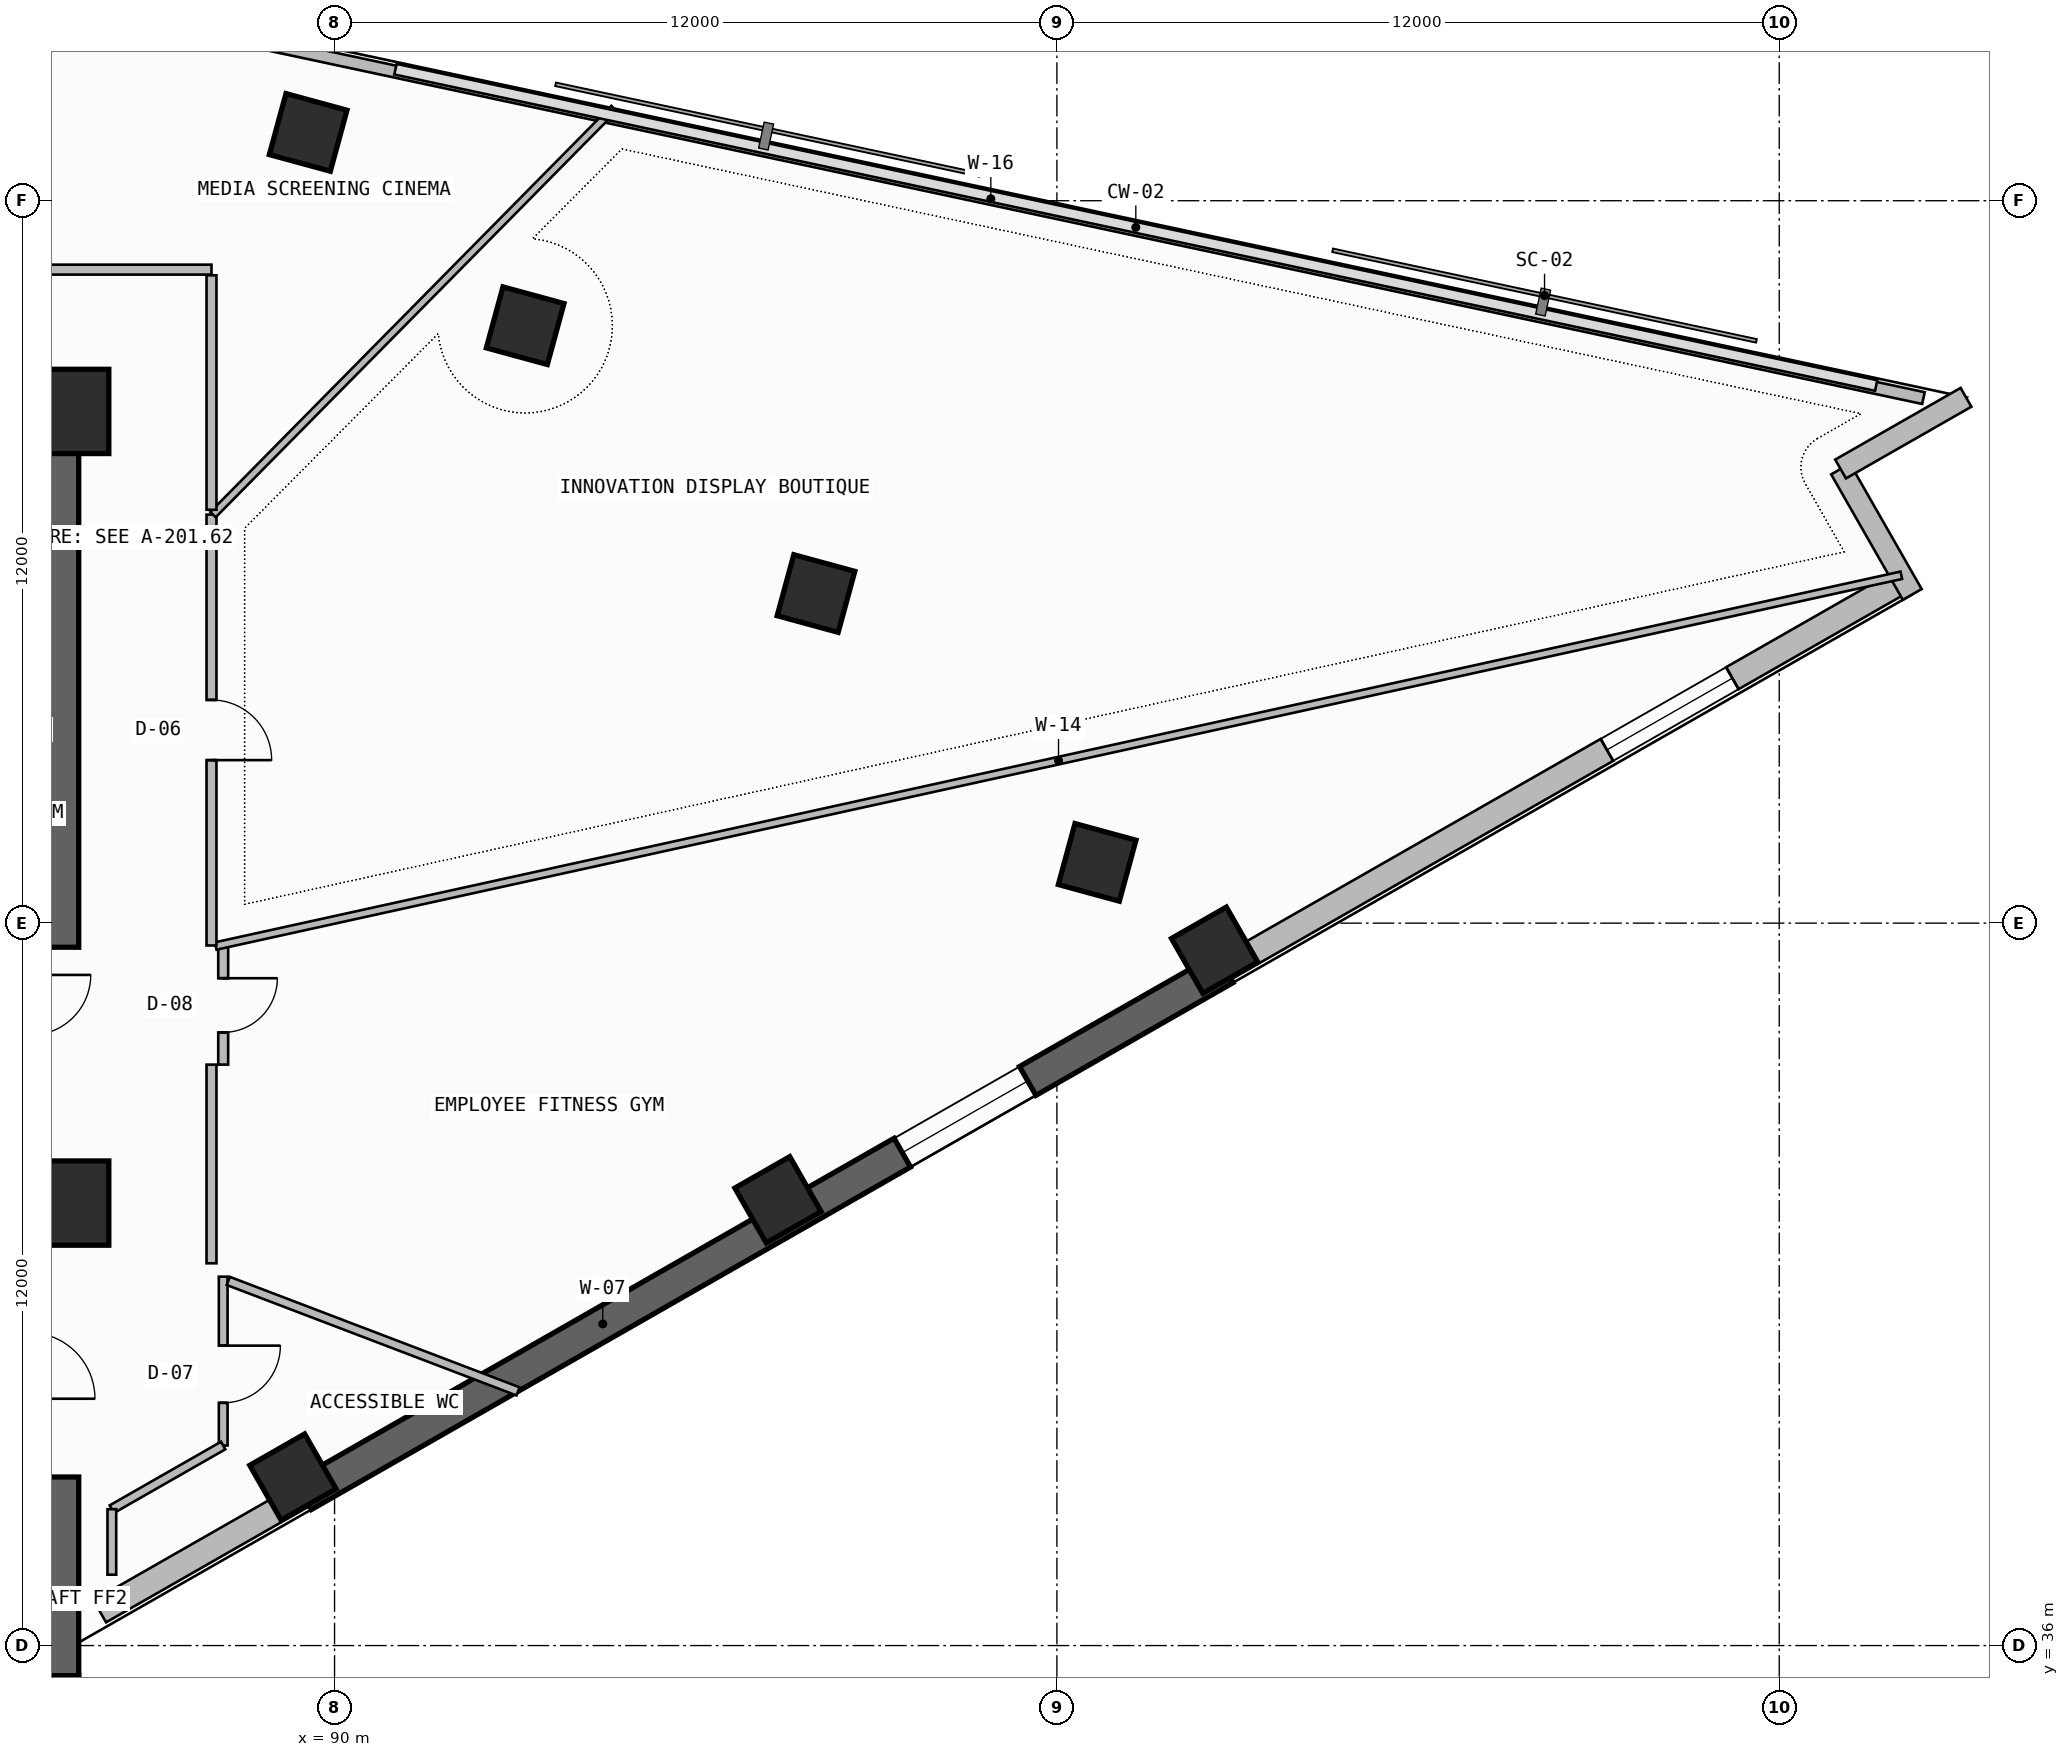
"""IFC4 building model, lengths in metres.
Left out: names, types, materials, properties, quantities, classifications, styles, units other than length and angle.
Written with IfcOpenShell. Run it as: python <this file> out.ifc"""

import sys

from ifc_helpers import new_model, si_unit, direction, frame, frame_2d, origin, origin_2d, place, context, subcontext, project, spatial, rectangle, extrude, element, fill, save


model = new_model("IFC4")
c1 = context("Model", 3, precision=1e-05, world=origin(), true_north=direction((0.0, 1.0)))
c2 = subcontext(c1, "Body", "Model", "MODEL_VIEW")
j1 = project(units=[si_unit("LENGTHUNIT", "METRE"), si_unit("PLANEANGLEUNIT", "RADIAN")], contexts=[c1])
p1 = place(None, origin())
s1 = spatial("IfcSite", under=j1, at=p1, CompositionType="ELEMENT")
p2 = place(p1, origin())
s2 = spatial("IfcBuilding", under=s1, at=p2, CompositionType="ELEMENT")
p3 = place(p2, frame((0.0, 0.0, 222.02)))
s3 = spatial("IfcBuildingStorey", under=s2, at=p3, CompositionType="ELEMENT", Elevation=222.02)
p4 = place(p3, frame((72.15, 35.125, -0.26), z_axis=(0.0, 0.0, 1.0), x_axis=(1.0, 0.0, 0.0)))
e1 = element("IfcWall", 1, at=p4, inside=s3, PredefinedType="SHEAR", context=c2, shape_type="SweptSolid", body=[
    extrude(rectangle(XDim=13.6, YDim=0.75, at=frame_2d((6.8, 0.0))), origin(), (0.0, 0.0, 1.0), 3.52),
])
p5 = place(p3, frame((85.375, 35.5, -0.26), z_axis=(0.0, 0.0, 1.0), x_axis=(0.0, 1.0, 0.0)))
e2 = element("IfcWall", 2, at=p5, inside=s3, PredefinedType="SHEAR", context=c2, shape_type="SweptSolid", body=[
    extrude(rectangle(XDim=3.3, YDim=0.75, at=frame_2d((1.65, 0.0))), origin(), (0.0, 0.0, 1.0), 3.52),
])
p6 = place(p3, frame((72.0, 56.425, -0.26), z_axis=(0.0, 0.0, 1.0), x_axis=(1.0, 0.0, 0.0)))
e3 = element("IfcWall", 3, at=p6, inside=s3, PredefinedType="SHEAR", context=c2, shape_type="SweptSolid", body=[
    extrude(rectangle(XDim=13.75, YDim=0.75, at=frame_2d((6.875, 0.0))), origin(), (0.0, 0.0, 1.0), 3.52),
])
p7 = place(p3, frame((85.375, 47.6, -0.26), z_axis=(0.0, 0.0, 1.0), x_axis=(0.0, 1.0, 0.0)))
e4 = element("IfcWall", 4, at=p7, inside=s3, PredefinedType="SHEAR", context=c2, shape_type="SweptSolid", body=[
    extrude(rectangle(XDim=8.45, YDim=0.75, at=frame_2d((4.225, 0.0))), origin(), (0.0, 0.0, 1.0), 3.52),
])
for number, where, z_axis, x_axis in (
    (5, (85.55, 43.35, 0.0), (0.0, 0.0, 1.0), (1.0, 0.0, 0.0)),
    (6, (85.55, 56.5, 0.0), (0.0, 0.0, 1.0), (1.0, 0.0, 0.0)),
):
    element("IfcColumn", number, at=place(p3, frame(where, z_axis=z_axis, x_axis=x_axis)), inside=s3, PredefinedType="COLUMN", context=c2, shape_type="SweptSolid", body=[
        extrude(rectangle(XDim=1.4, YDim=1.4, at=origin_2d()), origin(), (0.0, 0.0, 1.0), 3.52),
    ])
for number, where, z_axis, x_axis in (
    (7, (89.308, 38.799, 0.0), (0.0, 0.0, 1.0), (0.868, 0.496, 0.0)),
    (8, (97.367, 43.405, 0.0), (0.0, 0.0, 1.0), (0.868, 0.496, 0.0)),
    (9, (104.62, 47.55, 0.0), (0.0, 0.0, 1.0), (0.868, 0.496, 0.0)),
    (10, (102.669, 49.01, 0.0), (0.0, 0.0, 1.0), (0.263, 0.965, 0.0)),
    (11, (97.998, 53.475, 0.0), (0.0, 0.0, 1.0), (0.263, 0.965, 0.0)),
    (12, (93.167, 57.924, 0.0), (0.0, 0.0, 1.0), (0.263, 0.965, 0.0)),
    (13, (89.562, 61.135, 0.0), (0.0, 0.0, 1.0), (0.263, 0.965, 0.0)),
):
    element("IfcColumn", number, at=place(p3, frame(where, z_axis=z_axis, x_axis=x_axis)), inside=s3, PredefinedType="COLUMN", context=c2, shape_type="SweptSolid", body=[
        extrude(rectangle(XDim=1.05, YDim=1.05, at=origin_2d()), origin(), (0.0, 0.0, 1.0), 3.52),
    ])
p8 = place(p3, frame((86.1, 36.568, 0.0), z_axis=(0.0, 0.0, 1.0), x_axis=(0.868192956745, 0.496226752461, 0.0)))
e14 = element("IfcWall", 14, at=p8, inside=s3, PredefinedType="SOLIDWALL", context=c2, shape_type="SweptSolid", body=[
    extrude(rectangle(XDim=3.892, YDim=0.42, at=frame_2d((1.946, 0.0))), origin(), (0.0, 0.0, 1.0), 2.245),
])
p9 = place(p3, frame((89.479, 38.499, -0.26), z_axis=(0.0, 0.0, 1.0), x_axis=(0.868197136736, 0.496219439123, 0.0)))
e15 = element("IfcWall", 15, at=p9, inside=s3, PredefinedType="SHEAR", context=c2, shape_type="SweptSolid", body=[
    extrude(rectangle(XDim=17.636, YDim=0.55, at=frame_2d((8.818, 0.0))), origin(), (0.0, 0.0, 1.0), 3.52),
])
p10 = place(p9, frame((11.464, 0.0, 1.1)))
e16 = element("IfcOpeningElement", 16, at=p10, cuts=e15, PredefinedType="OPENING", context=c2, shape_type="SweptSolid", body=[
    extrude(rectangle(XDim=2.4, YDim=1.2, at=frame_2d((1.2, 0.6))), frame((0.0, 0.285, 0.0), z_axis=(0.0, -1.0, 0.0), x_axis=(1.0, 0.0, 0.0)), (0.0, 0.0, 1.0), 0.57),
])
p11 = place(p3, frame((104.791, 47.25, 0.0), z_axis=(0.0, 0.0, 1.0), x_axis=(0.868193423982, 0.496225934987, 0.0)))
e17 = element("IfcWall", 17, at=p11, inside=s3, PredefinedType="SOLIDWALL", context=c2, shape_type="SweptSolid", body=[
    extrude(rectangle(XDim=12.995, YDim=0.42, at=frame_2d((6.498, 0.0))), origin(), (0.0, 0.0, 1.0), 2.245),
])
p12 = place(p11, frame((7.31, 0.0, 0.965)))
e18 = element("IfcOpeningElement", 18, at=p12, cuts=e17, PredefinedType="OPENING", context=c2, shape_type="SweptSolid", body=[
    extrude(rectangle(XDim=2.4, YDim=1.2, at=frame_2d((1.2, 0.6))), frame((0.0, 0.22, 0.0), z_axis=(0.0, -1.0, 0.0), x_axis=(1.0, 0.0, 0.0)), (0.0, 0.0, 1.0), 0.44),
])
p13 = place(p3, frame((116.21, 53.46, 0.0), z_axis=(0.0, 0.0, 1.0), x_axis=(-0.496215637313, 0.868199309655, 0.0)))
e19 = element("IfcWall", 19, at=p13, inside=s3, PredefinedType="SOLIDWALL", context=c2, shape_type="SweptSolid", body=[
    extrude(rectangle(XDim=2.399, YDim=0.36, at=frame_2d((1.2, 0.0))), origin(), (0.0, 0.0, 1.0), 3.26),
])
p14 = place(p3, frame((115.019, 55.543, 0.0), z_axis=(0.0, 0.0, 1.0), x_axis=(0.86818053093, 0.4962484919, 0.0)))
e20 = element("IfcWall", 20, at=p14, inside=s3, PredefinedType="SOLIDWALL", context=c2, shape_type="SweptSolid", body=[
    extrude(rectangle(XDim=2.4, YDim=0.36, at=frame_2d((1.2, 0.0))), origin(), (0.0, 0.0, 1.0), 3.26),
])
p15 = place(p3, frame((116.396, 56.722, 0.0), z_axis=(0.0, 0.0, 1.0), x_axis=(-0.977936620644, 0.208901809478, 0.0)))
e21 = element("IfcWall", 21, at=p15, inside=s3, PredefinedType="PARAPET", context=c2, shape_type="SweptSolid", body=[
    extrude(rectangle(XDim=31.685, YDim=0.2, at=frame_2d((15.843, 0.0))), origin(), (0.0, 0.0, 1.0), 1.15),
])
p16 = place(p3, frame((88.15, 39.323, 0.0), z_axis=(0.0, 0.0, 1.0), x_axis=(0.0, 1.0, 0.0)))
e22 = element("IfcWall", 22, at=p16, inside=s3, PredefinedType="PARTITIONING", context=c2, shape_type="SweptSolid", body=[
    extrude(rectangle(XDim=2.805, YDim=0.145, at=frame_2d((1.402, 0.0))), origin(), (0.0, 0.0, 1.0), 2.745),
])
p17 = place(p16, frame((0.709, 0.0, 0.0)))
e23 = element("IfcOpeningElement", 23, at=p17, cuts=e22, PredefinedType="OPENING", context=c2, shape_type="SweptSolid", body=[
    extrude(rectangle(XDim=0.95, YDim=2.15, at=frame_2d((0.475, 1.075))), frame((0.0, 0.083, 0.0), z_axis=(0.0, -1.0, 0.0), x_axis=(1.0, 0.0, 0.0)), (0.0, 0.0, 1.0), 0.165),
])
p18 = place(p3, frame((86.3, 38.266, 0.0), z_axis=(0.0, 0.0, 1.0), x_axis=(0.868179674817, 0.496249989657, 0.0)))
e24 = element("IfcWall", 24, at=p18, inside=s3, PredefinedType="PARTITIONING", context=c2, shape_type="SweptSolid", body=[
    extrude(rectangle(XDim=2.131, YDim=0.145, at=frame_2d((1.065, 0.0))), origin(), (0.0, 0.0, 1.0), 3.26),
])
p19 = place(p3, frame((88.235, 42.057, 0.0), z_axis=(0.0, 0.0, 1.0), x_axis=(0.934412638953, -0.356192392066, 0.0)))
e25 = element("IfcWall", 25, at=p19, inside=s3, PredefinedType="PARTITIONING", context=c2, shape_type="SweptSolid", body=[
    extrude(rectangle(XDim=5.152, YDim=0.145, at=frame_2d((2.576, 0.0))), origin(), (0.0, 0.0, 1.0), 2.245),
])
p20 = place(p3, frame((87.955, 42.35, 0.0), z_axis=(0.0, 0.0, 1.0), x_axis=(0.0, 1.0, 0.0)))
e26 = element("IfcWall", 26, at=p20, inside=s3, PredefinedType="PARTITIONING", context=c2, shape_type="SweptSolid", body=[
    extrude(rectangle(XDim=3.3, YDim=0.165, at=frame_2d((1.65, 0.0))), origin(), (0.0, 0.0, 1.0), 2.745),
])
p21 = place(p3, frame((88.15, 45.65, 0.0), z_axis=(0.0, 0.0, 1.0), x_axis=(0.0, 1.0, 0.0)))
e27 = element("IfcWall", 27, at=p21, inside=s3, PredefinedType="PARTITIONING", context=c2, shape_type="SweptSolid", body=[
    extrude(rectangle(XDim=1.97, YDim=0.165, at=frame_2d((0.985, 0.0))), origin(), (0.0, 0.0, 1.0), 3.26),
])
p22 = place(p21, frame((0.535, 0.0, 0.0)))
e28 = element("IfcOpeningElement", 28, at=p22, cuts=e27, PredefinedType="OPENING", context=c2, shape_type="SweptSolid", body=[
    extrude(rectangle(XDim=0.9, YDim=2.1, at=frame_2d((0.45, 1.05))), frame((0.0, 0.093, 0.0), z_axis=(0.0, -1.0, 0.0), x_axis=(1.0, 0.0, 0.0)), (0.0, 0.0, 1.0), 0.185),
])
p23 = place(p3, frame((88.026, 47.62, 0.0), z_axis=(0.0, 0.0, 1.0), x_axis=(0.976658973775, 0.214795830835, 0.0)))
e29 = element("IfcWall", 29, at=p23, inside=s3, PredefinedType="PARTITIONING", context=c2, shape_type="SweptSolid", body=[
    extrude(rectangle(XDim=28.671, YDim=0.125, at=frame_2d((14.335, 0.0))), origin(), (0.0, 0.0, 1.0), 2.645),
])
p24 = place(p3, frame((87.955, 47.629, 0.0), z_axis=(0.0, 0.0, 1.0), x_axis=(0.0, 1.0, 0.0)))
e30 = element("IfcWall", 30, at=p24, inside=s3, PredefinedType="PARTITIONING", context=c2, shape_type="SweptSolid", body=[
    extrude(rectangle(XDim=7.157, YDim=0.165, at=frame_2d((3.579, 0.0))), origin(), (0.0, 0.0, 1.0), 3.26),
])
p25 = place(p24, frame((3.079, 0.0, 0.0)))
e31 = element("IfcOpeningElement", 31, at=p25, cuts=e30, PredefinedType="OPENING", context=c2, shape_type="SweptSolid", body=[
    extrude(rectangle(XDim=1.0, YDim=2.2, at=frame_2d((0.5, 1.1))), frame((0.0, 0.093, 0.0), z_axis=(0.0, -1.0, 0.0), x_axis=(1.0, 0.0, 0.0)), (0.0, 0.0, 1.0), 0.185),
])
p26 = place(p3, frame((87.981, 54.786, 0.0), z_axis=(0.0, 0.0, 1.0), x_axis=(0.702637523149, 0.711547968209, 0.0)))
e32 = element("IfcWall", 32, at=p26, inside=s3, PredefinedType="PARTITIONING", context=c2, shape_type="SweptSolid", body=[
    extrude(rectangle(XDim=9.48, YDim=0.125, at=frame_2d((4.74, 0.0))), origin(), (0.0, 0.0, 1.0), 2.645),
])
p27 = place(p3, frame((87.955, 58.855, 0.0), z_axis=(0.0, 0.0, 1.0), x_axis=(-1.0, 0.0, 0.0)))
e33 = element("IfcWall", 33, at=p27, inside=s3, PredefinedType="PARTITIONING", context=c2, shape_type="SweptSolid", body=[
    extrude(rectangle(XDim=6.296, YDim=0.165, at=frame_2d((3.148, 0.0))), origin(), (0.0, 0.0, 1.0), 2.745),
])
p28 = place(p27, frame((3.382, 0.0, 0.0)))
e34 = element("IfcOpeningElement", 34, at=p28, cuts=e33, PredefinedType="OPENING", context=c2, shape_type="SweptSolid", body=[
    extrude(rectangle(XDim=1.0, YDim=2.2, at=frame_2d((0.5, 1.1))), frame((0.0, 0.093, 0.0), z_axis=(0.0, -1.0, 0.0), x_axis=(1.0, 0.0, 0.0)), (0.0, 0.0, 1.0), 0.185),
])
p29 = place(p3, frame((87.955, 54.866, 0.0), z_axis=(0.0, 0.0, 1.0), x_axis=(0.0, 1.0, 0.0)))
e35 = element("IfcWall", 35, at=p29, inside=s3, PredefinedType="PARTITIONING", context=c2, shape_type="SweptSolid", body=[
    extrude(rectangle(XDim=3.895, YDim=0.165, at=frame_2d((1.947, 0.0))), origin(), (0.0, 0.0, 1.0), 2.745),
])
p30 = place(p3, frame((86.3, 37.177, 0.0), z_axis=(0.0, 0.0, 1.0), x_axis=(0.0, 1.0, 0.0)))
e36 = element("IfcWall", 36, at=p30, inside=s3, PredefinedType="PARTITIONING", context=c2, shape_type="SweptSolid", body=[
    extrude(rectangle(XDim=1.088, YDim=0.145, at=frame_2d((0.544, 0.0))), origin(), (0.0, 0.0, 1.0), 3.26),
])
p31 = place(p10, origin())
e37 = element("IfcWindow", 37, at=p31, inside=s3, PartitioningType="SINGLE_PANEL", PredefinedType="WINDOW", context=c2, shape_type="SweptSolid", body=[
    extrude(rectangle(XDim=2.4, YDim=1.2, at=frame_2d((1.2, 0.6))), frame((0.0, 0.03, 0.0), z_axis=(0.0, -1.0, 0.0), x_axis=(1.0, 0.0, 0.0)), (0.0, 0.0, 1.0), 0.06),
])
fill(e16, e37)
p32 = place(p12, origin())
e38 = element("IfcWindow", 38, at=p32, inside=s3, PartitioningType="SINGLE_PANEL", PredefinedType="WINDOW", context=c2, shape_type="SweptSolid", body=[
    extrude(rectangle(XDim=2.4, YDim=1.2, at=frame_2d((1.2, 0.6))), frame((0.0, 0.03, 0.0), z_axis=(0.0, -1.0, 0.0), x_axis=(1.0, 0.0, 0.0)), (0.0, 0.0, 1.0), 0.06),
])
fill(e18, e38)
p33 = place(p17, frame((0.95, 0.0, 0.0), z_axis=(0.0, 0.0, 1.0), x_axis=(-1.0, 0.0, 0.0)))
e39 = element("IfcDoor", 39, at=p33, inside=s3, OperationType="SINGLE_SWING_LEFT", PredefinedType="DOOR", context=c2, shape_type="SweptSolid", body=[
    extrude(rectangle(XDim=0.95, YDim=2.15, at=frame_2d((0.475, 1.075))), frame((0.0, 0.025, 0.0), z_axis=(0.0, -1.0, 0.0), x_axis=(1.0, 0.0, 0.0)), (0.0, 0.0, 1.0), 0.05),
])
fill(e23, e39)
p34 = place(p22, frame((0.9, 0.0, 0.0), z_axis=(0.0, 0.0, 1.0), x_axis=(-1.0, 0.0, 0.0)))
e40 = element("IfcDoor", 40, at=p34, inside=s3, OperationType="SINGLE_SWING_LEFT", PredefinedType="DOOR", context=c2, shape_type="SweptSolid", body=[
    extrude(rectangle(XDim=0.9, YDim=2.1, at=frame_2d((0.45, 1.05))), frame((0.0, 0.025, 0.0), z_axis=(0.0, -1.0, 0.0), x_axis=(1.0, 0.0, 0.0)), (0.0, 0.0, 1.0), 0.05),
])
fill(e28, e40)
p35 = place(p25, frame((1.0, 0.0, 0.0), z_axis=(0.0, 0.0, 1.0), x_axis=(-1.0, 0.0, 0.0)))
e41 = element("IfcDoor", 41, at=p35, inside=s3, OperationType="SINGLE_SWING_RIGHT", PredefinedType="DOOR", context=c2, shape_type="SweptSolid", body=[
    extrude(rectangle(XDim=1.0, YDim=2.2, at=frame_2d((0.5, 1.1))), frame((0.0, 0.025, 0.0), z_axis=(0.0, -1.0, 0.0), x_axis=(1.0, 0.0, 0.0)), (0.0, 0.0, 1.0), 0.05),
])
fill(e31, e41)
save(model, sys.argv[1])
